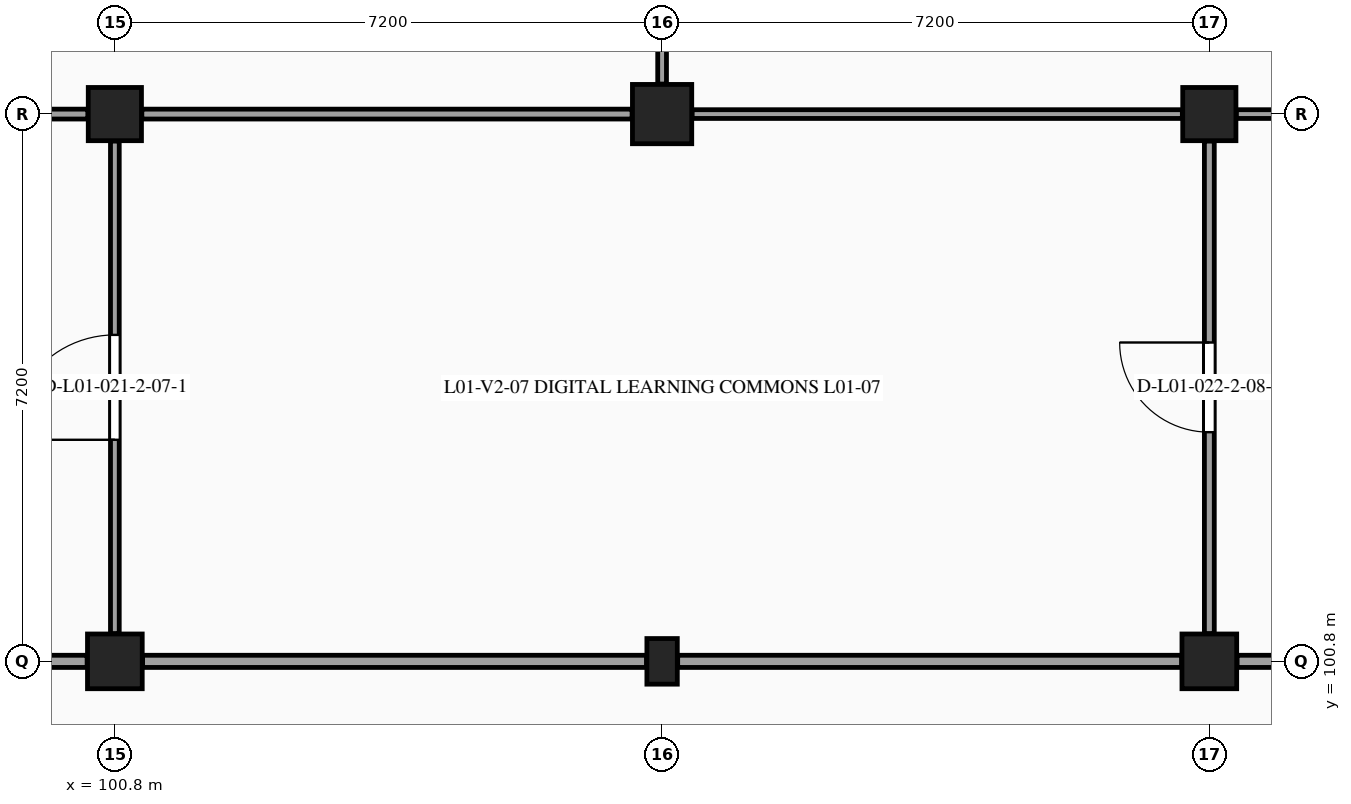
"""IFC4 building model, lengths in metres.
Left out: names, types, materials, properties, quantities, classifications, styles, units other than length and angle.
Written with IfcOpenShell. Run it as: python <this file> out.ifc"""

import sys

from ifc_helpers import new_model, si_unit, direction, frame, frame_2d, origin, origin_2d, place, context, subcontext, project, spatial, rectangle, extrude, element, fill, save


model = new_model("IFC4")
c1 = context("Model", 3, precision=1e-05, world=origin(), true_north=direction((0.0, 1.0)))
c2 = subcontext(c1, "Body", "Model", "MODEL_VIEW")
j1 = project(units=[si_unit("LENGTHUNIT", "METRE"), si_unit("PLANEANGLEUNIT", "RADIAN")], contexts=[c1])
p1 = place(None, origin())
s1 = spatial("IfcSite", under=j1, at=p1, CompositionType="ELEMENT")
p2 = place(p1, origin())
s2 = spatial("IfcBuilding", under=s1, at=p2, CompositionType="ELEMENT")
p3 = place(p2, frame((0.0, 0.0, 5.4)))
s3 = spatial("IfcBuildingStorey", under=s2, at=p3, CompositionType="ELEMENT", Elevation=5.4)
p4 = place(p3, frame((100.8, 100.8, 0.0), z_axis=(0.0, 0.0, 1.0), x_axis=(1.0, 0.0, 0.0)))
e1 = element("IfcColumn", 1, at=p4, inside=s3, PredefinedType="COLUMN", context=c2, shape_type="SweptSolid", body=[
    extrude(rectangle(XDim=0.72, YDim=0.72, at=origin_2d()), origin(), (0.0, 0.0, 1.0), 4.5),
])
p5 = place(p3, frame((100.8, 108.0, 0.0), z_axis=(0.0, 0.0, 1.0), x_axis=(1.0, 0.0, 0.0)))
e2 = element("IfcColumn", 2, at=p5, inside=s3, PredefinedType="COLUMN", context=c2, shape_type="SweptSolid", body=[
    extrude(rectangle(XDim=0.7, YDim=0.7, at=origin_2d()), origin(), (0.0, 0.0, 1.0), 4.5),
])
p6 = place(p3, frame((108.0, 100.8, 0.0), z_axis=(0.0, 0.0, 1.0), x_axis=(1.0, 0.0, 0.0)))
e3 = element("IfcColumn", 3, at=p6, inside=s3, PredefinedType="PILASTER", context=c2, shape_type="SweptSolid", body=[
    extrude(rectangle(XDim=0.4, YDim=0.6, at=origin_2d()), origin(), (0.0, 0.0, 1.0), 4.5),
])
p7 = place(p3, frame((108.0, 108.0, 0.0), z_axis=(0.0, 0.0, 1.0), x_axis=(1.0, 0.0, 0.0)))
e4 = element("IfcColumn", 4, at=p7, inside=s3, PredefinedType="COLUMN", context=c2, shape_type="SweptSolid", body=[
    extrude(rectangle(XDim=0.78, YDim=0.78, at=origin_2d()), origin(), (0.0, 0.0, 1.0), 4.5),
])
p8 = place(p3, frame((115.2, 100.8, 0.0), z_axis=(0.0, 0.0, 1.0), x_axis=(1.0, 0.0, 0.0)))
e5 = element("IfcColumn", 5, at=p8, inside=s3, PredefinedType="COLUMN", context=c2, shape_type="SweptSolid", body=[
    extrude(rectangle(XDim=0.72, YDim=0.72, at=origin_2d()), origin(), (0.0, 0.0, 1.0), 4.5),
])
p9 = place(p3, frame((115.2, 108.0, 0.0), z_axis=(0.0, 0.0, 1.0), x_axis=(1.0, 0.0, 0.0)))
e6 = element("IfcColumn", 6, at=p9, inside=s3, PredefinedType="COLUMN", context=c2, shape_type="SweptSolid", body=[
    extrude(rectangle(XDim=0.7, YDim=0.7, at=origin_2d()), origin(), (0.0, 0.0, 1.0), 4.5),
])
p10 = place(p3, frame((93.805, 100.8, 0.0), z_axis=(0.0, 0.0, 1.0), x_axis=(1.0, 0.0, 0.0)))
e7 = element("IfcWall", 7, at=p10, inside=s3, PredefinedType="PARTITIONING", context=c2, shape_type="SweptSolid", body=[
    extrude(rectangle(XDim=6.63, YDim=0.16, at=frame_2d((3.315, 0.0))), origin(), (0.0, 0.0, 1.0), 3.49),
])
p11 = place(p3, frame((100.8, 101.165, 0.0), z_axis=(0.0, 0.0, 1.0), x_axis=(0.0, 1.0, 0.0)))
e8 = element("IfcWall", 8, at=p11, inside=s3, PredefinedType="PARTITIONING", context=c2, shape_type="SweptSolid", body=[
    extrude(rectangle(XDim=6.48, YDim=0.115, at=frame_2d((3.24, 0.0))), origin(), (0.0, 0.0, 1.0), 3.525),
])
p12 = place(p11, frame((2.55, 0.0, 0.0)))
e9 = element("IfcOpeningElement", 9, at=p12, cuts=e8, PredefinedType="OPENING", context=c2, shape_type="SweptSolid", body=[
    extrude(rectangle(XDim=1.38, YDim=2.22, at=frame_2d((0.69, 1.11))), frame((0.0, 0.067, 0.0), z_axis=(0.0, -1.0, 0.0), x_axis=(1.0, 0.0, 0.0)), (0.0, 0.0, 1.0), 0.135),
])
p13 = place(p3, frame((93.995, 108.0, 0.0), z_axis=(0.0, 0.0, 1.0), x_axis=(1.0, 0.0, 0.0)))
e10 = element("IfcWall", 10, at=p13, inside=s3, PredefinedType="PARTITIONING", context=c2, shape_type="SweptSolid", body=[
    extrude(rectangle(XDim=6.45, YDim=0.13, at=frame_2d((3.225, 0.0))), origin(), (0.0, 0.0, 1.0), 3.49),
])
p14 = place(p3, frame((101.165, 100.8, 0.0), z_axis=(0.0, 0.0, 1.0), x_axis=(1.0, 0.0, 0.0)))
e11 = element("IfcWall", 11, at=p14, inside=s3, PredefinedType="PARTITIONING", context=c2, shape_type="SweptSolid", body=[
    extrude(rectangle(XDim=6.63, YDim=0.16, at=frame_2d((3.315, 0.0))), origin(), (0.0, 0.0, 1.0), 3.51),
])
p15 = place(p3, frame((101.155, 108.0, 0.0), z_axis=(0.0, 0.0, 1.0), x_axis=(1.0, 0.0, 0.0)))
e12 = element("IfcWall", 12, at=p15, inside=s3, PredefinedType="PARTITIONING", context=c2, shape_type="SweptSolid", body=[
    extrude(rectangle(XDim=6.45, YDim=0.13, at=frame_2d((3.225, 0.0))), origin(), (0.0, 0.0, 1.0), 3.51),
])
p16 = place(p3, frame((108.0, 108.395, 0.0), z_axis=(0.0, 0.0, 1.0), x_axis=(0.0, 1.0, 0.0)))
e13 = element("IfcWall", 13, at=p16, inside=s3, PredefinedType="PARTITIONING", context=c2, shape_type="SweptSolid", body=[
    extrude(rectangle(XDim=6.425, YDim=0.115, at=frame_2d((3.212, 0.0))), origin(), (0.0, 0.0, 1.0), 3.525),
])
p17 = place(p16, frame((2.433, 0.0, 0.0)))
e14 = element("IfcOpeningElement", 14, at=p17, cuts=e13, PredefinedType="OPENING", context=c2, shape_type="SweptSolid", body=[
    extrude(rectangle(XDim=1.56, YDim=2.25, at=frame_2d((0.78, 1.125))), frame((0.0, 0.067, 0.0), z_axis=(0.0, -1.0, 0.0), x_axis=(1.0, 0.0, 0.0)), (0.0, 0.0, 1.0), 0.135),
])
p18 = place(p3, frame((108.205, 100.8, 0.0), z_axis=(0.0, 0.0, 1.0), x_axis=(1.0, 0.0, 0.0)))
e15 = element("IfcWall", 15, at=p18, inside=s3, PredefinedType="PARTITIONING", context=c2, shape_type="SweptSolid", body=[
    extrude(rectangle(XDim=6.63, YDim=0.16, at=frame_2d((3.315, 0.0))), origin(), (0.0, 0.0, 1.0), 3.55),
])
p19 = place(p3, frame((115.2, 101.165, 0.0), z_axis=(0.0, 0.0, 1.0), x_axis=(0.0, 1.0, 0.0)))
e16 = element("IfcWall", 16, at=p19, inside=s3, PredefinedType="PARTITIONING", context=c2, shape_type="SweptSolid", body=[
    extrude(rectangle(XDim=6.48, YDim=0.13, at=frame_2d((3.24, 0.0))), origin(), (0.0, 0.0, 1.0), 3.525),
])
p20 = place(p19, frame((2.65, 0.0, 0.0)))
e17 = element("IfcOpeningElement", 17, at=p20, cuts=e16, PredefinedType="OPENING", context=c2, shape_type="SweptSolid", body=[
    extrude(rectangle(XDim=1.18, YDim=2.18, at=frame_2d((0.59, 1.09))), frame((0.0, 0.075, 0.0), z_axis=(0.0, -1.0, 0.0), x_axis=(1.0, 0.0, 0.0)), (0.0, 0.0, 1.0), 0.15),
])
p21 = place(p3, frame((108.395, 108.0, 0.0), z_axis=(0.0, 0.0, 1.0), x_axis=(1.0, 0.0, 0.0)))
e18 = element("IfcWall", 18, at=p21, inside=s3, PredefinedType="PARTITIONING", context=c2, shape_type="SweptSolid", body=[
    extrude(rectangle(XDim=6.45, YDim=0.115, at=frame_2d((3.225, 0.0))), origin(), (0.0, 0.0, 1.0), 3.55),
])
p22 = place(p3, frame((115.565, 100.8, 0.0), z_axis=(0.0, 0.0, 1.0), x_axis=(1.0, 0.0, 0.0)))
e19 = element("IfcWall", 19, at=p22, inside=s3, PredefinedType="PARTITIONING", context=c2, shape_type="SweptSolid", body=[
    extrude(rectangle(XDim=6.63, YDim=0.16, at=frame_2d((3.315, 0.0))), origin(), (0.0, 0.0, 1.0), 3.56),
])
p23 = place(p3, frame((115.555, 108.0, 0.0), z_axis=(0.0, 0.0, 1.0), x_axis=(1.0, 0.0, 0.0)))
e20 = element("IfcWall", 20, at=p23, inside=s3, PredefinedType="PARTITIONING", context=c2, shape_type="SweptSolid", body=[
    extrude(rectangle(XDim=6.45, YDim=0.115, at=frame_2d((3.225, 0.0))), origin(), (0.0, 0.0, 1.0), 3.56),
])
p24 = place(p12, origin())
e21 = element("IfcDoor", 21, at=p24, inside=s3, OperationType="SINGLE_SWING_LEFT", PredefinedType="DOOR", context=c2, shape_type="SweptSolid", body=[
    extrude(rectangle(XDim=1.38, YDim=2.22, at=frame_2d((0.69, 1.11))), frame((0.0, 0.025, 0.0), z_axis=(0.0, -1.0, 0.0), x_axis=(1.0, 0.0, 0.0)), (0.0, 0.0, 1.0), 0.05),
])
fill(e9, e21)
p25 = place(p20, origin())
e22 = element("IfcDoor", 22, at=p25, inside=s3, OperationType="SINGLE_SWING_RIGHT", PredefinedType="DOOR", context=c2, shape_type="SweptSolid", body=[
    extrude(rectangle(XDim=1.18, YDim=2.18, at=frame_2d((0.59, 1.09))), frame((0.0, 0.025, 0.0), z_axis=(0.0, -1.0, 0.0), x_axis=(1.0, 0.0, 0.0)), (0.0, 0.0, 1.0), 0.05),
])
fill(e17, e22)
save(model, sys.argv[1])
